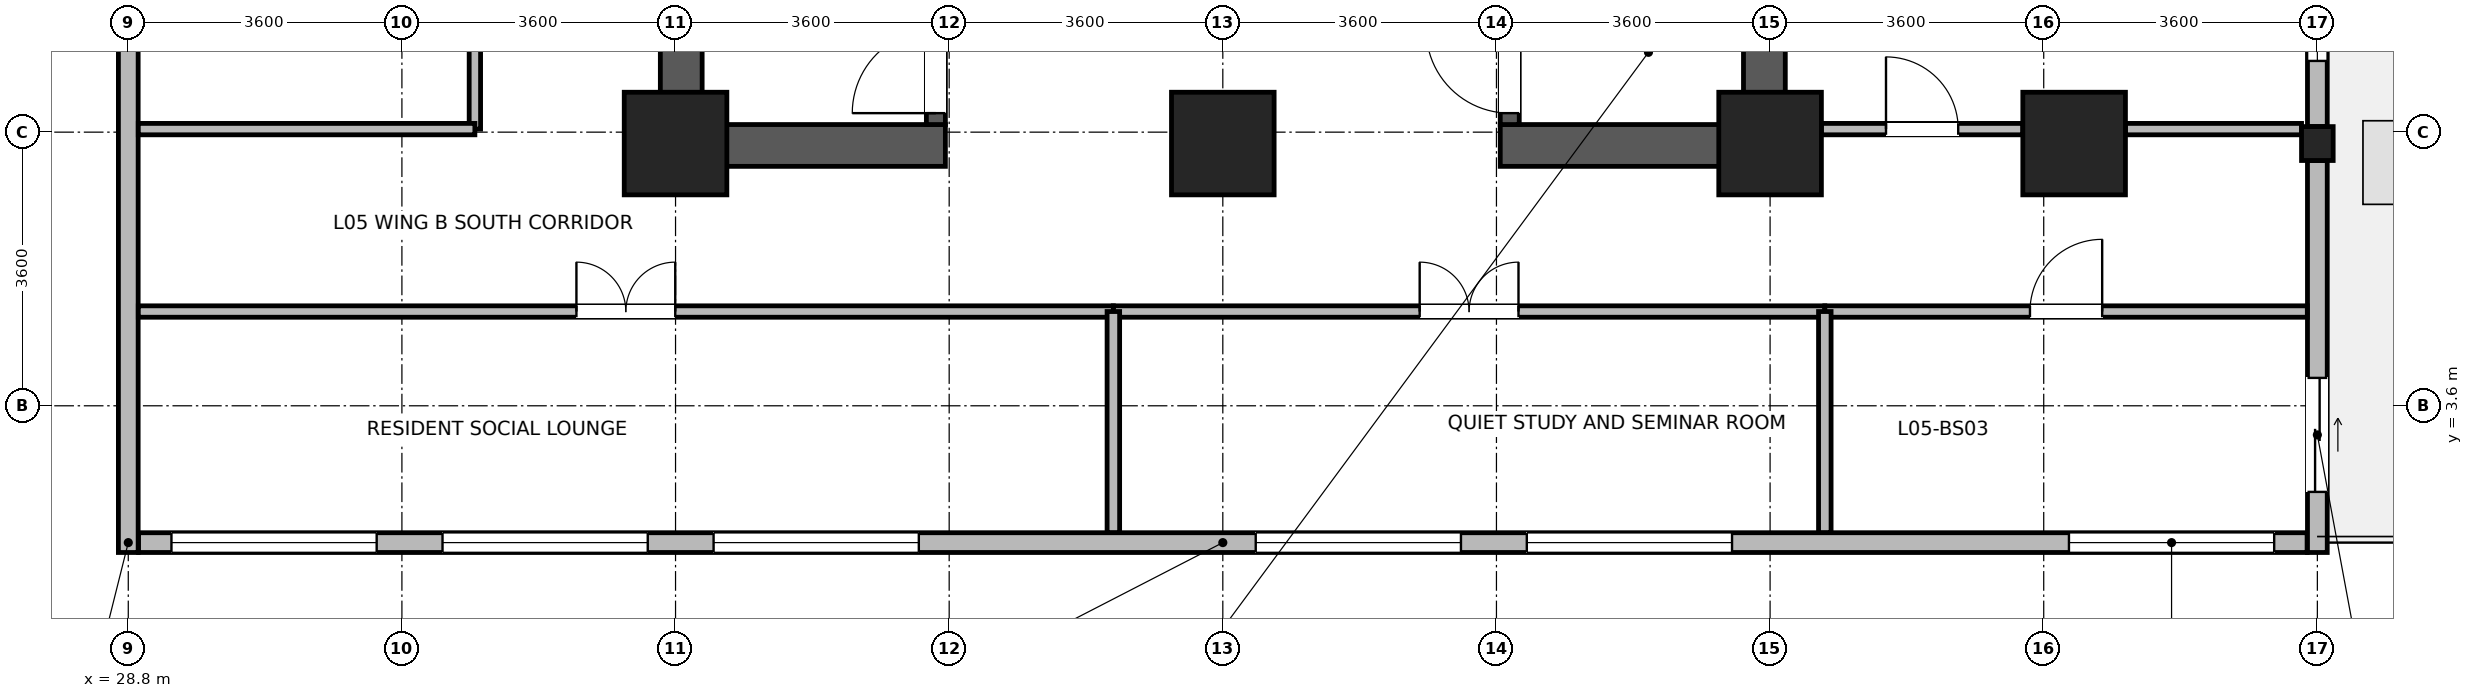
"""IFC4 building model, lengths in metres.
Left out: names, types, materials, properties, quantities, classifications, styles, units other than length and angle.
Written with IfcOpenShell. Run it as: python <this file> out.ifc"""

import sys

from ifc_helpers import new_model, si_unit, direction, frame, frame_2d, origin, origin_2d, place, context, subcontext, project, spatial, rectangle, i_section, extrude, source, transform, mapped, element, fill, save


model = new_model("IFC4")
c1 = context("Model", 3, precision=1e-05, world=origin(), true_north=direction((0.0, 1.0)))
c2 = subcontext(c1, "Body", "Model", "MODEL_VIEW")
j1 = project(units=[si_unit("LENGTHUNIT", "METRE"), si_unit("PLANEANGLEUNIT", "RADIAN")], contexts=[c1])
p1 = place(None, origin())
s1 = spatial("IfcSite", under=j1, at=p1, CompositionType="ELEMENT")
p2 = place(p1, origin())
s2 = spatial("IfcBuilding", under=s1, at=p2, CompositionType="ELEMENT")
p3 = place(p2, frame((0.0, 0.0, 25.3)))
s3 = spatial("IfcBuildingStorey", under=s2, at=p3, CompositionType="ELEMENT", Elevation=25.3)
for number, where, z_axis, x_axis in (
    (1, (36.075, 6.75, 0.0), (0.0, 0.0, 1.0), (0.0, 1.0, 0.0)),
    (2, (50.325, 6.75, 0.0), (0.0, 0.0, 1.0), (0.0, 1.0, 0.0)),
):
    element("IfcWall", number, at=place(p3, frame(where, z_axis=z_axis, x_axis=x_axis)), inside=s3, PredefinedType="SHEAR", context=c2, shape_type="SweptSolid", body=[
        extrude(rectangle(XDim=8.1, YDim=0.55, at=frame_2d((4.05, 0.0))), origin(), (0.0, 0.0, 1.0), 3.45),
    ])
for number, where, z_axis, x_axis in (
    (3, (36.35, 7.025, 0.0), (0.0, 0.0, 1.0), (1.0, 0.0, 0.0)),
    (4, (46.85, 7.025, 0.0), (0.0, 0.0, 1.0), (1.0, 0.0, 0.0)),
):
    element("IfcWall", number, at=place(p3, frame(where, z_axis=z_axis, x_axis=x_axis)), inside=s3, PredefinedType="SHEAR", context=c2, shape_type="SweptSolid", body=[
        extrude(rectangle(XDim=3.2, YDim=0.55, at=frame_2d((1.6, 0.0))), origin(), (0.0, 0.0, 1.0), 3.45),
    ])
p4 = place(p3, frame((39.425, 7.3, 0.0), z_axis=(0.0, 0.0, 1.0), x_axis=(0.0, 1.0, 0.0)))
e5 = element("IfcWall", 5, at=p4, inside=s3, PredefinedType="SHEAR", context=c2, shape_type="SweptSolid", body=[
    extrude(rectangle(XDim=7.0, YDim=0.25, at=frame_2d((3.5, 0.0))), origin(), (0.0, 0.0, 1.0), 3.45),
])
p5 = place(p4, frame((0.15, 0.0, 0.0)))
e6 = element("IfcOpeningElement", 6, at=p5, cuts=e5, PredefinedType="OPENING", context=c2, shape_type="SweptSolid", body=[
    extrude(rectangle(XDim=1.1, YDim=2.08, at=frame_2d((0.55, 1.04))), frame((0.0, 0.135, 0.0), z_axis=(0.0, -1.0, 0.0), x_axis=(1.0, 0.0, 0.0)), (0.0, 0.0, 1.0), 0.27),
])
p6 = place(p3, frame((46.975, 7.3, 0.0), z_axis=(0.0, 0.0, 1.0), x_axis=(0.0, 1.0, 0.0)))
e7 = element("IfcWall", 7, at=p6, inside=s3, PredefinedType="SHEAR", context=c2, shape_type="SweptSolid", body=[
    extrude(rectangle(XDim=7.0, YDim=0.25, at=frame_2d((3.5, 0.0))), origin(), (0.0, 0.0, 1.0), 3.45),
])
p7 = place(p6, frame((0.15, 0.0, 0.0)))
e8 = element("IfcOpeningElement", 8, at=p7, cuts=e7, PredefinedType="OPENING", context=c2, shape_type="SweptSolid", body=[
    extrude(rectangle(XDim=1.1, YDim=2.08, at=frame_2d((0.55, 1.04))), frame((0.0, 0.135, 0.0), z_axis=(0.0, -1.0, 0.0), x_axis=(1.0, 0.0, 0.0)), (0.0, 0.0, 1.0), 0.27),
])
m1 = source(origin(), c2, "Body", "SweptSolid", [
    extrude(rectangle(XDim=1.35, YDim=1.35, at=origin_2d()), origin(), (0.0, 0.0, 1.0), 3.7),
])
for number, where, z_axis, x_axis in (
    (9, (36.0, 7.05, 0.0), (0.0, 0.0, 1.0), (1.0, 0.0, 0.0)),
    (10, (43.2, 7.05, 0.0), (0.0, 0.0, 1.0), (1.0, 0.0, 0.0)),
    (11, (50.4, 7.05, 0.0), (0.0, 0.0, 1.0), (1.0, 0.0, 0.0)),
    (12, (54.4, 7.05, 0.0), (0.0, 0.0, 1.0), (1.0, 0.0, 0.0)),
):
    element("IfcColumn", number, at=place(p3, frame(where, z_axis=z_axis, x_axis=x_axis)), inside=s3, PredefinedType="COLUMN", context=c2, shape_type="MappedRepresentation", body=[
        mapped(m1, transform((0.0, 0.0, 0.0), x_axis=(1.0, 0.0, 0.0), y_axis=(0.0, 1.0, 0.0), z_axis=(0.0, 0.0, 1.0), scale=1.0)),
    ])
m2 = source(origin(), c2, "Body", "SweptSolid", [
    extrude(i_section(OverallWidth=0.416, OverallDepth=0.446, WebThickness=0.029, FlangeThickness=0.04, FilletRadius=0.015, at=origin_2d()), origin(), (0.0, 0.0, 1.0), 3.7),
])
p8 = place(p3, frame((57.6, 7.05, 0.0), z_axis=(0.0, 0.0, 1.0), x_axis=(1.0, 0.0, 0.0)))
e13 = element("IfcColumn", 13, at=p8, inside=s3, PredefinedType="COLUMN", context=c2, shape_type="MappedRepresentation", body=[
    mapped(m2, transform((0.0, 0.0, 0.0), x_axis=(1.0, 0.0, 0.0), y_axis=(0.0, 1.0, 0.0), z_axis=(0.0, 0.0, 1.0), scale=1.0)),
])
p9 = place(p3, frame((57.465, 1.8, 0.0), z_axis=(0.0, 0.0, 1.0), x_axis=(-1.0, 0.0, 0.0)))
e14 = element("IfcWall", 14, at=p9, inside=s3, PredefinedType="STANDARD", context=c2, shape_type="SweptSolid", body=[
    extrude(rectangle(XDim=28.53, YDim=0.26, at=frame_2d((14.265, 0.0))), origin(), (0.0, 0.0, 1.0), 3.43),
])
p10 = place(p9, frame((0.433, 0.0, 0.85)))
e15 = element("IfcOpeningElement", 15, at=p10, cuts=e14, PredefinedType="OPENING", context=c2, shape_type="SweptSolid", body=[
    extrude(rectangle(XDim=2.7, YDim=2.05, at=frame_2d((1.35, 1.025))), frame((0.0, 0.14, 0.0), z_axis=(0.0, -1.0, 0.0), x_axis=(1.0, 0.0, 0.0)), (0.0, 0.0, 1.0), 0.28),
])
p11 = place(p9, frame((7.566, 0.0, 0.85)))
e16 = element("IfcOpeningElement", 16, at=p11, cuts=e14, PredefinedType="OPENING", context=c2, shape_type="SweptSolid", body=[
    extrude(rectangle(XDim=2.7, YDim=2.05, at=frame_2d((1.35, 1.025))), frame((0.0, 0.14, 0.0), z_axis=(0.0, -1.0, 0.0), x_axis=(1.0, 0.0, 0.0)), (0.0, 0.0, 1.0), 0.28),
])
p12 = place(p9, frame((11.132, 0.0, 0.85)))
e17 = element("IfcOpeningElement", 17, at=p12, cuts=e14, PredefinedType="OPENING", context=c2, shape_type="SweptSolid", body=[
    extrude(rectangle(XDim=2.7, YDim=2.05, at=frame_2d((1.35, 1.025))), frame((0.0, 0.14, 0.0), z_axis=(0.0, -1.0, 0.0), x_axis=(1.0, 0.0, 0.0)), (0.0, 0.0, 1.0), 0.28),
])
p13 = place(p9, frame((18.264, 0.0, 0.85)))
e18 = element("IfcOpeningElement", 18, at=p13, cuts=e14, PredefinedType="OPENING", context=c2, shape_type="SweptSolid", body=[
    extrude(rectangle(XDim=2.7, YDim=2.05, at=frame_2d((1.35, 1.025))), frame((0.0, 0.14, 0.0), z_axis=(0.0, -1.0, 0.0), x_axis=(1.0, 0.0, 0.0)), (0.0, 0.0, 1.0), 0.28),
])
p14 = place(p9, frame((21.831, 0.0, 0.85)))
e19 = element("IfcOpeningElement", 19, at=p14, cuts=e14, PredefinedType="OPENING", context=c2, shape_type="SweptSolid", body=[
    extrude(rectangle(XDim=2.7, YDim=2.05, at=frame_2d((1.35, 1.025))), frame((0.0, 0.14, 0.0), z_axis=(0.0, -1.0, 0.0), x_axis=(1.0, 0.0, 0.0)), (0.0, 0.0, 1.0), 0.28),
])
p15 = place(p9, frame((25.397, 0.0, 0.85)))
e20 = element("IfcOpeningElement", 20, at=p15, cuts=e14, PredefinedType="OPENING", context=c2, shape_type="SweptSolid", body=[
    extrude(rectangle(XDim=2.7, YDim=2.05, at=frame_2d((1.35, 1.025))), frame((0.0, 0.14, 0.0), z_axis=(0.0, -1.0, 0.0), x_axis=(1.0, 0.0, 0.0)), (0.0, 0.0, 1.0), 0.28),
])
p16 = place(p3, frame((57.6, 6.826, 0.0), z_axis=(0.0, 0.0, 1.0), x_axis=(0.0, -1.0, 0.0)))
e21 = element("IfcWall", 21, at=p16, inside=s3, PredefinedType="STANDARD", context=c2, shape_type="SweptSolid", body=[
    extrude(rectangle(XDim=5.156, YDim=0.26, at=frame_2d((2.578, 0.0))), origin(), (0.0, 0.0, 1.0), 3.43),
])
p17 = place(p16, frame((2.859, 0.0, 0.0)))
e22 = element("IfcOpeningElement", 22, at=p17, cuts=e21, PredefinedType="OPENING", context=c2, shape_type="SweptSolid", body=[
    extrude(rectangle(XDim=1.5, YDim=2.15, at=frame_2d((0.75, 1.075))), frame((0.0, 0.14, 0.0), z_axis=(0.0, -1.0, 0.0), x_axis=(1.0, 0.0, 0.0)), (0.0, 0.0, 1.0), 0.28),
])
p18 = place(p3, frame((57.6, 14.326, 0.0), z_axis=(0.0, 0.0, 1.0), x_axis=(0.0, -1.0, 0.0)))
e23 = element("IfcWall", 23, at=p18, inside=s3, PredefinedType="STANDARD", context=c2, shape_type="SweptSolid", body=[
    extrude(rectangle(XDim=7.052, YDim=0.26, at=frame_2d((3.526, 0.0))), origin(), (0.0, 0.0, 1.0), 2.93),
])
p19 = place(p18, frame((0.863, 0.0, 0.85)))
e24 = element("IfcOpeningElement", 24, at=p19, cuts=e23, PredefinedType="OPENING", context=c2, shape_type="SweptSolid", body=[
    extrude(rectangle(XDim=1.8, YDim=1.85, at=frame_2d((0.9, 0.925))), frame((0.0, 0.14, 0.0), z_axis=(0.0, -1.0, 0.0), x_axis=(1.0, 0.0, 0.0)), (0.0, 0.0, 1.0), 0.28),
])
p20 = place(p18, frame((4.389, 0.0, 0.85)))
e25 = element("IfcOpeningElement", 25, at=p20, cuts=e23, PredefinedType="OPENING", context=c2, shape_type="SweptSolid", body=[
    extrude(rectangle(XDim=1.8, YDim=1.85, at=frame_2d((0.9, 0.925))), frame((0.0, 0.14, 0.0), z_axis=(0.0, -1.0, 0.0), x_axis=(1.0, 0.0, 0.0)), (0.0, 0.0, 1.0), 0.28),
])
p21 = place(p3, frame((28.8, 1.67, 0.0), z_axis=(0.0, 0.0, 1.0), x_axis=(0.0, 1.0, 0.0)))
e26 = element("IfcWall", 26, at=p21, inside=s3, PredefinedType="STANDARD", context=c2, shape_type="SweptSolid", body=[
    extrude(rectangle(XDim=19.254, YDim=0.26, at=frame_2d((9.627, 0.0))), origin(), (0.0, 0.0, 1.0), 3.43),
])
p22 = place(p21, frame((6.673, 0.0, 0.85)))
e27 = element("IfcOpeningElement", 27, at=p22, cuts=e26, PredefinedType="OPENING", context=c2, shape_type="SweptSolid", body=[
    extrude(rectangle(XDim=2.7, YDim=2.05, at=frame_2d((1.35, 1.025))), frame((0.0, 0.14, 0.0), z_axis=(0.0, -1.0, 0.0), x_axis=(1.0, 0.0, 0.0)), (0.0, 0.0, 1.0), 0.28),
])
p23 = place(p21, frame((13.091, 0.0, 0.85)))
e28 = element("IfcOpeningElement", 28, at=p23, cuts=e26, PredefinedType="OPENING", context=c2, shape_type="SweptSolid", body=[
    extrude(rectangle(XDim=2.7, YDim=2.05, at=frame_2d((1.35, 1.025))), frame((0.0, 0.14, 0.0), z_axis=(0.0, -1.0, 0.0), x_axis=(1.0, 0.0, 0.0)), (0.0, 0.0, 1.0), 0.28),
])
p24 = place(p3, frame((28.932, 4.84, 0.0), z_axis=(0.0, 0.0, 1.0), x_axis=(1.0, 0.0, 0.0)))
e29 = element("IfcWall", 29, at=p24, inside=s3, PredefinedType="PARTITIONING", context=c2, shape_type="SweptSolid", body=[
    extrude(rectangle(XDim=12.828, YDim=0.15, at=frame_2d((6.414, 0.0))), origin(), (0.0, 0.0, 1.0), 3.43),
])
p25 = place(p24, frame((5.764, 0.0, 0.0)))
e30 = element("IfcOpeningElement", 30, at=p25, cuts=e29, PredefinedType="OPENING", context=c2, shape_type="SweptSolid", body=[
    extrude(rectangle(XDim=1.3, YDim=2.12, at=frame_2d((0.65, 1.06))), frame((0.0, 0.085, 0.0), z_axis=(0.0, -1.0, 0.0), x_axis=(1.0, 0.0, 0.0)), (0.0, 0.0, 1.0), 0.17),
])
p26 = place(p3, frame((41.76, 4.84, 0.0), z_axis=(0.0, 0.0, 1.0), x_axis=(1.0, 0.0, 0.0)))
e31 = element("IfcWall", 31, at=p26, inside=s3, PredefinedType="PARTITIONING", context=c2, shape_type="SweptSolid", body=[
    extrude(rectangle(XDim=9.36, YDim=0.15, at=frame_2d((4.68, 0.0))), origin(), (0.0, 0.0, 1.0), 3.43),
])
p27 = place(p26, frame((4.03, 0.0, 0.0)))
e32 = element("IfcOpeningElement", 32, at=p27, cuts=e31, PredefinedType="OPENING", context=c2, shape_type="SweptSolid", body=[
    extrude(rectangle(XDim=1.3, YDim=2.12, at=frame_2d((0.65, 1.06))), frame((0.0, 0.085, 0.0), z_axis=(0.0, -1.0, 0.0), x_axis=(1.0, 0.0, 0.0)), (0.0, 0.0, 1.0), 0.17),
])
p28 = place(p3, frame((33.36, 7.24, 0.0), z_axis=(0.0, 0.0, 1.0), x_axis=(0.0, 1.0, 0.0)))
e33 = element("IfcWall", 33, at=p28, inside=s3, PredefinedType="PARTITIONING", context=c2, shape_type="SweptSolid", body=[
    extrude(rectangle(XDim=7.26, YDim=0.15, at=frame_2d((3.63, 0.0))), origin(), (0.0, 0.0, 1.0), 3.43),
])
p29 = place(p28, frame((2.98, 0.0, 0.0)))
e34 = element("IfcOpeningElement", 34, at=p29, cuts=e33, PredefinedType="OPENING", context=c2, shape_type="SweptSolid", body=[
    extrude(rectangle(XDim=1.3, YDim=2.12, at=frame_2d((0.65, 1.06))), frame((0.0, 0.085, 0.0), z_axis=(0.0, -1.0, 0.0), x_axis=(1.0, 0.0, 0.0)), (0.0, 0.0, 1.0), 0.17),
])
p30 = place(p3, frame((51.075, 7.24, 0.0), z_axis=(0.0, 0.0, 1.0), x_axis=(1.0, 0.0, 0.0)))
e35 = element("IfcWall", 35, at=p30, inside=s3, PredefinedType="PARTITIONING", context=c2, shape_type="SweptSolid", body=[
    extrude(rectangle(XDim=2.65, YDim=0.15, at=frame_2d((1.325, 0.0))), origin(), (0.0, 0.0, 1.0), 2.78),
])
p31 = place(p30, frame((0.85, 0.0, 0.0)))
e36 = element("IfcOpeningElement", 36, at=p31, cuts=e35, PredefinedType="OPENING", context=c2, shape_type="SweptSolid", body=[
    extrude(rectangle(XDim=0.95, YDim=2.1, at=frame_2d((0.475, 1.05))), frame((0.0, 0.085, 0.0), z_axis=(0.0, -1.0, 0.0), x_axis=(1.0, 0.0, 0.0)), (0.0, 0.0, 1.0), 0.17),
])
p32 = place(p3, frame((55.075, 7.24, 0.0), z_axis=(0.0, 0.0, 1.0), x_axis=(1.0, 0.0, 0.0)))
e37 = element("IfcWall", 37, at=p32, inside=s3, PredefinedType="PARTITIONING", context=c2, shape_type="SweptSolid", body=[
    extrude(rectangle(XDim=2.317, YDim=0.15, at=frame_2d((1.159, 0.0))), origin(), (0.0, 0.0, 1.0), 2.78),
])
p33 = place(p3, frame((51.12, 4.84, 0.0), z_axis=(0.0, 0.0, 1.0), x_axis=(1.0, 0.0, 0.0)))
e38 = element("IfcWall", 38, at=p33, inside=s3, PredefinedType="PARTITIONING", context=c2, shape_type="SweptSolid", body=[
    extrude(rectangle(XDim=6.348, YDim=0.15, at=frame_2d((3.174, 0.0))), origin(), (0.0, 0.0, 1.0), 3.43),
])
p34 = place(p33, frame((2.699, 0.0, 0.0)))
e39 = element("IfcOpeningElement", 39, at=p34, cuts=e38, PredefinedType="OPENING", context=c2, shape_type="SweptSolid", body=[
    extrude(rectangle(XDim=0.95, YDim=2.1, at=frame_2d((0.475, 1.05))), frame((0.0, 0.085, 0.0), z_axis=(0.0, -1.0, 0.0), x_axis=(1.0, 0.0, 0.0)), (0.0, 0.0, 1.0), 0.17),
])
p35 = place(p3, frame((28.932, 7.24, 0.0), z_axis=(0.0, 0.0, 1.0), x_axis=(1.0, 0.0, 0.0)))
e40 = element("IfcWall", 40, at=p35, inside=s3, PredefinedType="PARTITIONING", context=c2, shape_type="SweptSolid", body=[
    extrude(rectangle(XDim=4.428, YDim=0.15, at=frame_2d((2.214, 0.0))), origin(), (0.0, 0.0, 1.0), 3.43),
])
for number, where, z_axis, x_axis in (
    (41, (41.76, 1.932, 0.0), (0.0, 0.0, 1.0), (0.0, 1.0, 0.0)),
    (42, (51.12, 1.932, 0.0), (0.0, 0.0, 1.0), (0.0, 1.0, 0.0)),
):
    element("IfcWall", number, at=place(p3, frame(where, z_axis=z_axis, x_axis=x_axis)), inside=s3, PredefinedType="PARTITIONING", context=c2, shape_type="SweptSolid", body=[
        extrude(rectangle(XDim=2.908, YDim=0.165, at=frame_2d((1.454, 0.0))), origin(), (0.0, 0.0, 1.0), 3.43),
    ])
p36 = place(p10, origin())
e43 = element("IfcWindow", 43, at=p36, inside=s3, PartitioningType="SINGLE_PANEL", PredefinedType="WINDOW", context=c2, shape_type="SweptSolid", body=[
    extrude(rectangle(XDim=2.7, YDim=2.05, at=frame_2d((1.35, 1.025))), frame((0.0, 0.03, 0.0), z_axis=(0.0, -1.0, 0.0), x_axis=(1.0, 0.0, 0.0)), (0.0, 0.0, 1.0), 0.06),
])
fill(e15, e43)
p37 = place(p11, origin())
e44 = element("IfcWindow", 44, at=p37, inside=s3, PartitioningType="SINGLE_PANEL", PredefinedType="WINDOW", context=c2, shape_type="SweptSolid", body=[
    extrude(rectangle(XDim=2.7, YDim=2.05, at=frame_2d((1.35, 1.025))), frame((0.0, 0.03, 0.0), z_axis=(0.0, -1.0, 0.0), x_axis=(1.0, 0.0, 0.0)), (0.0, 0.0, 1.0), 0.06),
])
fill(e16, e44)
p38 = place(p12, origin())
e45 = element("IfcWindow", 45, at=p38, inside=s3, PartitioningType="SINGLE_PANEL", PredefinedType="WINDOW", context=c2, shape_type="SweptSolid", body=[
    extrude(rectangle(XDim=2.7, YDim=2.05, at=frame_2d((1.35, 1.025))), frame((0.0, 0.03, 0.0), z_axis=(0.0, -1.0, 0.0), x_axis=(1.0, 0.0, 0.0)), (0.0, 0.0, 1.0), 0.06),
])
fill(e17, e45)
p39 = place(p13, origin())
e46 = element("IfcWindow", 46, at=p39, inside=s3, PartitioningType="SINGLE_PANEL", PredefinedType="WINDOW", context=c2, shape_type="SweptSolid", body=[
    extrude(rectangle(XDim=2.7, YDim=2.05, at=frame_2d((1.35, 1.025))), frame((0.0, 0.03, 0.0), z_axis=(0.0, -1.0, 0.0), x_axis=(1.0, 0.0, 0.0)), (0.0, 0.0, 1.0), 0.06),
])
fill(e18, e46)
p40 = place(p14, origin())
e47 = element("IfcWindow", 47, at=p40, inside=s3, PartitioningType="SINGLE_PANEL", PredefinedType="WINDOW", context=c2, shape_type="SweptSolid", body=[
    extrude(rectangle(XDim=2.7, YDim=2.05, at=frame_2d((1.35, 1.025))), frame((0.0, 0.03, 0.0), z_axis=(0.0, -1.0, 0.0), x_axis=(1.0, 0.0, 0.0)), (0.0, 0.0, 1.0), 0.06),
])
fill(e19, e47)
p41 = place(p15, origin())
e48 = element("IfcWindow", 48, at=p41, inside=s3, PartitioningType="SINGLE_PANEL", PredefinedType="WINDOW", context=c2, shape_type="SweptSolid", body=[
    extrude(rectangle(XDim=2.7, YDim=2.05, at=frame_2d((1.35, 1.025))), frame((0.0, 0.03, 0.0), z_axis=(0.0, -1.0, 0.0), x_axis=(1.0, 0.0, 0.0)), (0.0, 0.0, 1.0), 0.06),
])
fill(e20, e48)
p42 = place(p17, origin())
e49 = element("IfcDoor", 49, at=p42, inside=s3, OperationType="SLIDING_TO_LEFT", PredefinedType="DOOR", context=c2, shape_type="SweptSolid", body=[
    extrude(rectangle(XDim=1.5, YDim=2.15, at=frame_2d((0.75, 1.075))), frame((0.0, 0.025, 0.0), z_axis=(0.0, -1.0, 0.0), x_axis=(1.0, 0.0, 0.0)), (0.0, 0.0, 1.0), 0.05),
])
fill(e22, e49)
p43 = place(p20, origin())
e50 = element("IfcWindow", 50, at=p43, inside=s3, PartitioningType="SINGLE_PANEL", PredefinedType="WINDOW", context=c2, shape_type="SweptSolid", body=[
    extrude(rectangle(XDim=1.8, YDim=1.85, at=frame_2d((0.9, 0.925))), frame((0.0, 0.03, 0.0), z_axis=(0.0, -1.0, 0.0), x_axis=(1.0, 0.0, 0.0)), (0.0, 0.0, 1.0), 0.06),
])
fill(e25, e50)
p44 = place(p5, origin())
e51 = element("IfcDoor", 51, at=p44, inside=s3, OperationType="SINGLE_SWING_LEFT", PredefinedType="DOOR", context=c2, shape_type="SweptSolid", body=[
    extrude(rectangle(XDim=1.1, YDim=2.08, at=frame_2d((0.55, 1.04))), frame((0.0, 0.025, 0.0), z_axis=(0.0, -1.0, 0.0), x_axis=(1.0, 0.0, 0.0)), (0.0, 0.0, 1.0), 0.05),
])
fill(e6, e51)
p45 = place(p7, origin())
e52 = element("IfcDoor", 52, at=p45, inside=s3, OperationType="SINGLE_SWING_RIGHT", PredefinedType="DOOR", context=c2, shape_type="SweptSolid", body=[
    extrude(rectangle(XDim=1.1, YDim=2.08, at=frame_2d((0.55, 1.04))), frame((0.0, 0.025, 0.0), z_axis=(0.0, -1.0, 0.0), x_axis=(1.0, 0.0, 0.0)), (0.0, 0.0, 1.0), 0.05),
])
fill(e8, e52)
p46 = place(p25, origin())
e53 = element("IfcDoor", 53, at=p46, inside=s3, OperationType="DOUBLE_DOOR_SINGLE_SWING", PredefinedType="DOOR", context=c2, shape_type="SweptSolid", body=[
    extrude(rectangle(XDim=1.3, YDim=2.12, at=frame_2d((0.65, 1.06))), frame((0.0, 0.025, 0.0), z_axis=(0.0, -1.0, 0.0), x_axis=(1.0, 0.0, 0.0)), (0.0, 0.0, 1.0), 0.05),
])
fill(e30, e53)
p47 = place(p27, origin())
e54 = element("IfcDoor", 54, at=p47, inside=s3, OperationType="DOUBLE_DOOR_SINGLE_SWING", PredefinedType="DOOR", context=c2, shape_type="SweptSolid", body=[
    extrude(rectangle(XDim=1.3, YDim=2.12, at=frame_2d((0.65, 1.06))), frame((0.0, 0.025, 0.0), z_axis=(0.0, -1.0, 0.0), x_axis=(1.0, 0.0, 0.0)), (0.0, 0.0, 1.0), 0.05),
])
fill(e32, e54)
p48 = place(p31, origin())
e55 = element("IfcDoor", 55, at=p48, inside=s3, OperationType="SINGLE_SWING_LEFT", PredefinedType="DOOR", context=c2, shape_type="SweptSolid", body=[
    extrude(rectangle(XDim=0.95, YDim=2.1, at=frame_2d((0.475, 1.05))), frame((0.0, 0.025, 0.0), z_axis=(0.0, -1.0, 0.0), x_axis=(1.0, 0.0, 0.0)), (0.0, 0.0, 1.0), 0.05),
])
fill(e36, e55)
p49 = place(p34, origin())
e56 = element("IfcDoor", 56, at=p49, inside=s3, OperationType="SINGLE_SWING_RIGHT", PredefinedType="DOOR", context=c2, shape_type="SweptSolid", body=[
    extrude(rectangle(XDim=0.95, YDim=2.1, at=frame_2d((0.475, 1.05))), frame((0.0, 0.025, 0.0), z_axis=(0.0, -1.0, 0.0), x_axis=(1.0, 0.0, 0.0)), (0.0, 0.0, 1.0), 0.05),
])
fill(e39, e56)
save(model, sys.argv[1])
